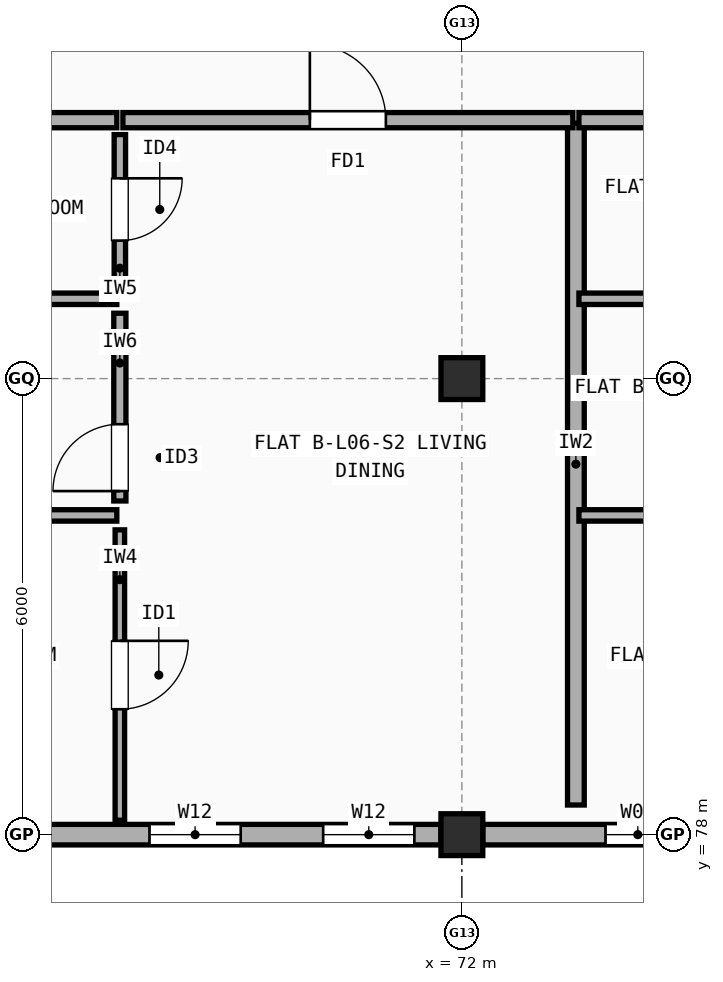
"""IFC4 building model, lengths in metres.
Left out: names, types, materials, properties, quantities, classifications, styles, units other than length and angle.
Written with IfcOpenShell. Run it as: python <this file> out.ifc"""

import sys

from ifc_helpers import new_model, si_unit, direction, frame, frame_2d, origin, origin_2d, place, context, subcontext, project, spatial, rectangle, extrude, element, fill, save


model = new_model("IFC4")
c1 = context("Model", 3, precision=1e-05, world=origin(), true_north=direction((0.0, 1.0)))
c2 = subcontext(c1, "Body", "Model", "MODEL_VIEW")
j1 = project(units=[si_unit("LENGTHUNIT", "METRE"), si_unit("PLANEANGLEUNIT", "RADIAN")], contexts=[c1])
p1 = place(None, origin())
s1 = spatial("IfcSite", under=j1, at=p1, CompositionType="ELEMENT")
p2 = place(p1, origin())
s2 = spatial("IfcBuilding", under=s1, at=p2, CompositionType="ELEMENT")
p3 = place(p2, frame((0.0, 0.0, 20.5)))
s3 = spatial("IfcBuildingStorey", under=s2, at=p3, CompositionType="ELEMENT", Elevation=20.5)
for number, where, z_axis, x_axis in (
    (1, (72.0, 78.0, 0.0), (0.0, 0.0, 1.0), (1.0, 0.0, 0.0)),
    (2, (72.0, 84.0, 0.0), (0.0, 0.0, 1.0), (1.0, 0.0, 0.0)),
):
    element("IfcColumn", number, at=place(p3, frame(where, z_axis=z_axis, x_axis=x_axis)), inside=s3, PredefinedType="COLUMN", context=c2, shape_type="SweptSolid", body=[
        extrude(rectangle(XDim=0.55, YDim=0.55, at=origin_2d()), origin(), (0.0, 0.0, 1.0), 2.97),
    ])
p4 = place(p3, frame((66.275, 78.0, 0.0), z_axis=(0.0, 0.0, 1.0), x_axis=(1.0, 0.0, 0.0)))
e3 = element("IfcWall", 3, at=p4, inside=s3, PredefinedType="STANDARD", context=c2, shape_type="SweptSolid", body=[
    extrude(rectangle(XDim=5.45, YDim=0.27, at=frame_2d((2.725, 0.0))), origin(), (0.0, 0.0, 1.0), 2.452),
])
p5 = place(p4, frame((1.615, 0.0, 0.9)))
e4 = element("IfcOpeningElement", 4, at=p5, cuts=e3, PredefinedType="OPENING", context=c2, shape_type="SweptSolid", body=[
    extrude(rectangle(XDim=1.2, YDim=1.35, at=frame_2d((0.6, 0.675))), frame((0.0, 0.145, 0.0), z_axis=(0.0, -1.0, 0.0), x_axis=(1.0, 0.0, 0.0)), (0.0, 0.0, 1.0), 0.29),
])
p6 = place(p4, frame((3.9, 0.0, 0.9)))
e5 = element("IfcOpeningElement", 5, at=p6, cuts=e3, PredefinedType="OPENING", context=c2, shape_type="SweptSolid", body=[
    extrude(rectangle(XDim=1.2, YDim=1.35, at=frame_2d((0.6, 0.675))), frame((0.0, 0.145, 0.0), z_axis=(0.0, -1.0, 0.0), x_axis=(1.0, 0.0, 0.0)), (0.0, 0.0, 1.0), 0.29),
])
p7 = place(p3, frame((72.275, 78.0, 0.0), z_axis=(0.0, 0.0, 1.0), x_axis=(1.0, 0.0, 0.0)))
e6 = element("IfcWall", 6, at=p7, inside=s3, PredefinedType="STANDARD", context=c2, shape_type="SweptSolid", body=[
    extrude(rectangle(XDim=5.475, YDim=0.27, at=frame_2d((2.738, 0.0))), origin(), (0.0, 0.0, 1.0), 2.452),
])
p8 = place(p7, frame((1.615, 0.0, 0.9)))
e7 = element("IfcOpeningElement", 7, at=p8, cuts=e6, PredefinedType="OPENING", context=c2, shape_type="SweptSolid", body=[
    extrude(rectangle(XDim=0.85, YDim=1.25, at=frame_2d((0.425, 0.625))), frame((0.0, 0.145, 0.0), z_axis=(0.0, -1.0, 0.0), x_axis=(1.0, 0.0, 0.0)), (0.0, 0.0, 1.0), 0.29),
])
p9 = place(p7, frame((4.275, 0.0, 0.9)))
e8 = element("IfcOpeningElement", 8, at=p9, cuts=e6, PredefinedType="OPENING", context=c2, shape_type="SweptSolid", body=[
    extrude(rectangle(XDim=0.85, YDim=1.25, at=frame_2d((0.425, 0.625))), frame((0.0, 0.145, 0.0), z_axis=(0.0, -1.0, 0.0), x_axis=(1.0, 0.0, 0.0)), (0.0, 0.0, 1.0), 0.29),
])
p10 = place(p3, frame((73.5, 78.39, 0.0), z_axis=(0.0, 0.0, 1.0), x_axis=(0.0, 1.0, 0.0)))
e9 = element("IfcWall", 9, at=p10, inside=s3, PredefinedType="SOLIDWALL", context=c2, shape_type="SweptSolid", body=[
    extrude(rectangle(XDim=8.97, YDim=0.22, at=frame_2d((4.485, 0.0))), origin(), (0.0, 0.0, 1.0), 2.452),
])
p11 = place(p3, frame((63.04, 87.4, 0.0), z_axis=(0.0, 0.0, 1.0), x_axis=(1.0, 0.0, 0.0)))
e10 = element("IfcWall", 10, at=p11, inside=s3, PredefinedType="SOLIDWALL", context=c2, shape_type="SweptSolid", body=[
    extrude(rectangle(XDim=4.42, YDim=0.2, at=frame_2d((2.21, 0.0))), origin(), (0.0, 0.0, 1.0), 2.458),
])
p12 = place(p3, frame((67.54, 87.4, 0.0), z_axis=(0.0, 0.0, 1.0), x_axis=(1.0, 0.0, 0.0)))
e11 = element("IfcWall", 11, at=p12, inside=s3, PredefinedType="SOLIDWALL", context=c2, shape_type="SweptSolid", body=[
    extrude(rectangle(XDim=5.92, YDim=0.2, at=frame_2d((2.96, 0.0))), origin(), (0.0, 0.0, 1.0), 2.548),
])
p13 = place(p12, frame((2.46, 0.0, 0.0)))
e12 = element("IfcOpeningElement", 12, at=p13, cuts=e11, PredefinedType="OPENING", context=c2, shape_type="SweptSolid", body=[
    extrude(rectangle(XDim=1.0, YDim=2.15, at=frame_2d((0.5, 1.075))), frame((0.0, 0.11, 0.0), z_axis=(0.0, -1.0, 0.0), x_axis=(1.0, 0.0, 0.0)), (0.0, 0.0, 1.0), 0.22),
])
p14 = place(p3, frame((67.5, 78.19, 0.0), z_axis=(0.0, 0.0, 1.0), x_axis=(0.0, 1.0, 0.0)))
e13 = element("IfcWall", 13, at=p14, inside=s3, PredefinedType="PARTITIONING", context=c2, shape_type="SweptSolid", body=[
    extrude(rectangle(XDim=3.82, YDim=0.125, at=frame_2d((1.91, 0.0))), origin(), (0.0, 0.0, 1.0), 2.97),
])
p15 = place(p14, frame((1.46, 0.0, 0.0)))
e14 = element("IfcOpeningElement", 14, at=p15, cuts=e13, PredefinedType="OPENING", context=c2, shape_type="SweptSolid", body=[
    extrude(rectangle(XDim=0.9, YDim=2.1, at=frame_2d((0.45, 1.05))), frame((0.0, 0.073, 0.0), z_axis=(0.0, -1.0, 0.0), x_axis=(1.0, 0.0, 0.0)), (0.0, 0.0, 1.0), 0.145),
])
p16 = place(p3, frame((67.5, 82.39, 0.0), z_axis=(0.0, 0.0, 1.0), x_axis=(0.0, 1.0, 0.0)))
e15 = element("IfcWall", 15, at=p16, inside=s3, PredefinedType="PLUMBINGWALL", context=c2, shape_type="SweptSolid", body=[
    extrude(rectangle(XDim=2.47, YDim=0.16, at=frame_2d((1.235, 0.0))), origin(), (0.0, 0.0, 1.0), 2.452),
])
p17 = place(p16, frame((0.13, 0.0, 0.0)))
e16 = element("IfcOpeningElement", 16, at=p17, cuts=e15, PredefinedType="OPENING", context=c2, shape_type="SweptSolid", body=[
    extrude(rectangle(XDim=0.88, YDim=2.1, at=frame_2d((0.44, 1.05))), frame((0.0, 0.09, 0.0), z_axis=(0.0, -1.0, 0.0), x_axis=(1.0, 0.0, 0.0)), (0.0, 0.0, 1.0), 0.18),
])
p18 = place(p3, frame((67.5, 85.24, 0.0), z_axis=(0.0, 0.0, 1.0), x_axis=(0.0, 1.0, 0.0)))
e17 = element("IfcWall", 17, at=p18, inside=s3, PredefinedType="PARTITIONING", context=c2, shape_type="SweptSolid", body=[
    extrude(rectangle(XDim=1.97, YDim=0.15, at=frame_2d((0.985, 0.0))), origin(), (0.0, 0.0, 1.0), 2.97),
])
p19 = place(p18, frame((0.575, 0.0, 0.0)))
e18 = element("IfcOpeningElement", 18, at=p19, cuts=e17, PredefinedType="OPENING", context=c2, shape_type="SweptSolid", body=[
    extrude(rectangle(XDim=0.82, YDim=2.08, at=frame_2d((0.41, 1.04))), frame((0.0, 0.085, 0.0), z_axis=(0.0, -1.0, 0.0), x_axis=(1.0, 0.0, 0.0)), (0.0, 0.0, 1.0), 0.17),
])
p20 = place(p3, frame((63.04, 82.2, 0.0), z_axis=(0.0, 0.0, 1.0), x_axis=(1.0, 0.0, 0.0)))
e19 = element("IfcWall", 19, at=p20, inside=s3, PredefinedType="PARTITIONING", context=c2, shape_type="SweptSolid", body=[
    extrude(rectangle(XDim=4.42, YDim=0.15, at=frame_2d((2.21, 0.0))), origin(), (0.0, 0.0, 1.0), 2.508),
])
p21 = place(p3, frame((63.04, 85.05, 0.0), z_axis=(0.0, 0.0, 1.0), x_axis=(1.0, 0.0, 0.0)))
e20 = element("IfcWall", 20, at=p21, inside=s3, PredefinedType="PARTITIONING", context=c2, shape_type="SweptSolid", body=[
    extrude(rectangle(XDim=4.42, YDim=0.15, at=frame_2d((2.21, 0.0))), origin(), (0.0, 0.0, 1.0), 2.458),
])
p22 = place(p3, frame((73.54, 87.4, 0.0), z_axis=(0.0, 0.0, 1.0), x_axis=(1.0, 0.0, 0.0)))
e21 = element("IfcWall", 21, at=p22, inside=s3, PredefinedType="SOLIDWALL", context=c2, shape_type="SweptSolid", body=[
    extrude(rectangle(XDim=4.42, YDim=0.2, at=frame_2d((2.21, 0.0))), origin(), (0.0, 0.0, 1.0), 2.452),
])
for number, where, z_axis, x_axis in (
    (22, (73.54, 82.2, 0.0), (0.0, 0.0, 1.0), (1.0, 0.0, 0.0)),
    (23, (73.54, 85.05, 0.0), (0.0, 0.0, 1.0), (1.0, 0.0, 0.0)),
):
    element("IfcWall", number, at=place(p3, frame(where, z_axis=z_axis, x_axis=x_axis)), inside=s3, PredefinedType="PARTITIONING", context=c2, shape_type="SweptSolid", body=[
        extrude(rectangle(XDim=4.42, YDim=0.15, at=frame_2d((2.21, 0.0))), origin(), (0.0, 0.0, 1.0), 2.452),
    ])
p23 = place(p5, origin())
e24 = element("IfcWindow", 24, at=p23, inside=s3, PartitioningType="SINGLE_PANEL", PredefinedType="WINDOW", context=c2, shape_type="SweptSolid", body=[
    extrude(rectangle(XDim=1.2, YDim=1.35, at=frame_2d((0.6, 0.675))), frame((0.0, 0.03, 0.0), z_axis=(0.0, -1.0, 0.0), x_axis=(1.0, 0.0, 0.0)), (0.0, 0.0, 1.0), 0.06),
])
fill(e4, e24)
p24 = place(p6, origin())
e25 = element("IfcWindow", 25, at=p24, inside=s3, PartitioningType="SINGLE_PANEL", PredefinedType="WINDOW", context=c2, shape_type="SweptSolid", body=[
    extrude(rectangle(XDim=1.2, YDim=1.35, at=frame_2d((0.6, 0.675))), frame((0.0, 0.03, 0.0), z_axis=(0.0, -1.0, 0.0), x_axis=(1.0, 0.0, 0.0)), (0.0, 0.0, 1.0), 0.06),
])
fill(e5, e25)
p25 = place(p8, origin())
e26 = element("IfcWindow", 26, at=p25, inside=s3, PartitioningType="SINGLE_PANEL", PredefinedType="WINDOW", context=c2, shape_type="SweptSolid", body=[
    extrude(rectangle(XDim=0.85, YDim=1.25, at=frame_2d((0.425, 0.625))), frame((0.0, 0.03, 0.0), z_axis=(0.0, -1.0, 0.0), x_axis=(1.0, 0.0, 0.0)), (0.0, 0.0, 1.0), 0.06),
])
fill(e7, e26)
p26 = place(p13, origin())
e27 = element("IfcDoor", 27, at=p26, inside=s3, OperationType="SINGLE_SWING_LEFT", PredefinedType="DOOR", context=c2, shape_type="SweptSolid", body=[
    extrude(rectangle(XDim=1.0, YDim=2.15, at=frame_2d((0.5, 1.075))), frame((0.0, 0.025, 0.0), z_axis=(0.0, -1.0, 0.0), x_axis=(1.0, 0.0, 0.0)), (0.0, 0.0, 1.0), 0.05),
])
fill(e12, e27)
p27 = place(p15, origin())
e28 = element("IfcDoor", 28, at=p27, inside=s3, OperationType="SINGLE_SWING_RIGHT", PredefinedType="DOOR", context=c2, shape_type="SweptSolid", body=[
    extrude(rectangle(XDim=0.9, YDim=2.1, at=frame_2d((0.45, 1.05))), frame((0.0, 0.025, 0.0), z_axis=(0.0, -1.0, 0.0), x_axis=(1.0, 0.0, 0.0)), (0.0, 0.0, 1.0), 0.05),
])
fill(e14, e28)
p28 = place(p17, origin())
e29 = element("IfcDoor", 29, at=p28, inside=s3, OperationType="SINGLE_SWING_LEFT", PredefinedType="DOOR", context=c2, shape_type="SweptSolid", body=[
    extrude(rectangle(XDim=0.88, YDim=2.1, at=frame_2d((0.44, 1.05))), frame((0.0, 0.025, 0.0), z_axis=(0.0, -1.0, 0.0), x_axis=(1.0, 0.0, 0.0)), (0.0, 0.0, 1.0), 0.05),
])
fill(e16, e29)
p29 = place(p19, origin())
e30 = element("IfcDoor", 30, at=p29, inside=s3, OperationType="SINGLE_SWING_RIGHT", PredefinedType="DOOR", context=c2, shape_type="SweptSolid", body=[
    extrude(rectangle(XDim=0.82, YDim=2.08, at=frame_2d((0.41, 1.04))), frame((0.0, 0.025, 0.0), z_axis=(0.0, -1.0, 0.0), x_axis=(1.0, 0.0, 0.0)), (0.0, 0.0, 1.0), 0.05),
])
fill(e18, e30)
save(model, sys.argv[1])
